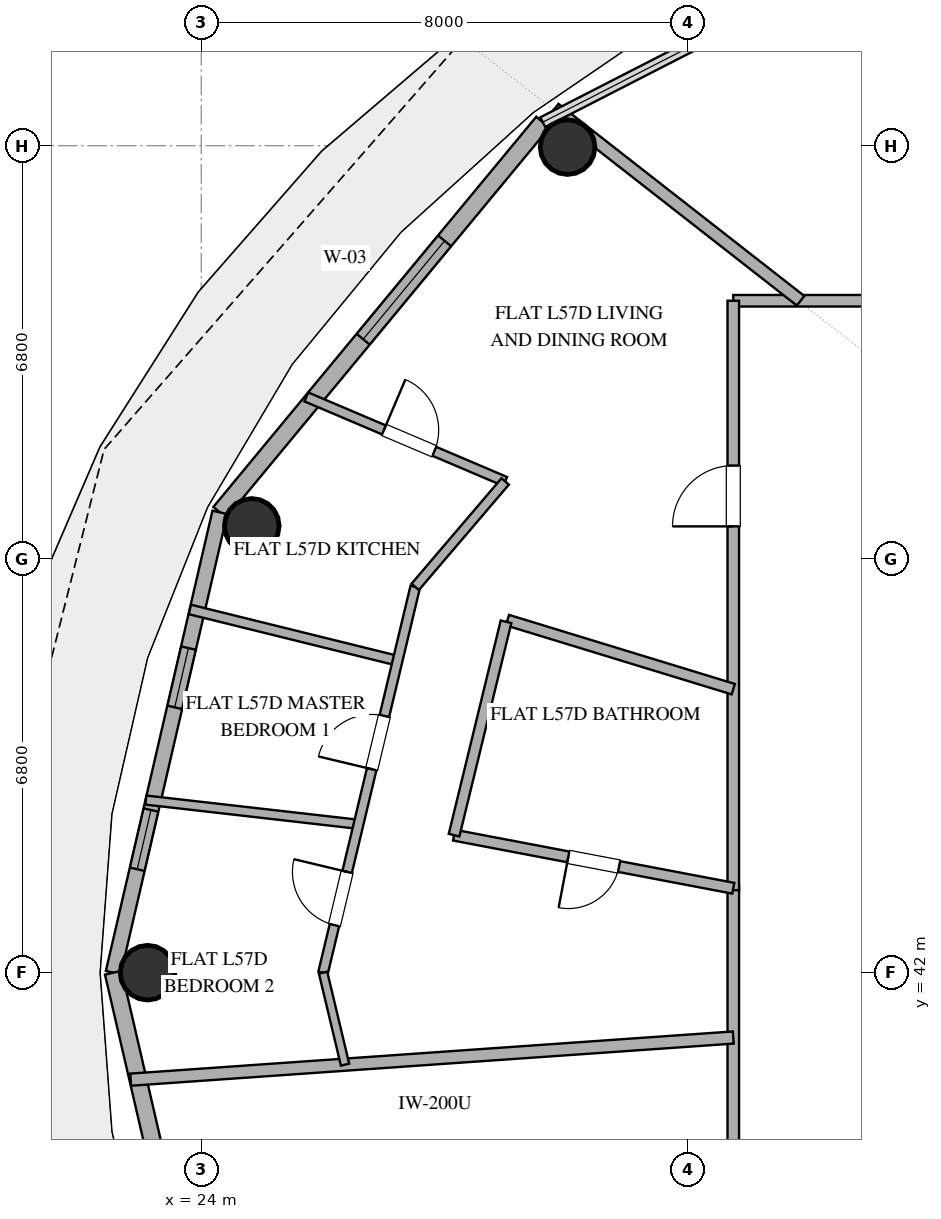
"""IFC4 building model, lengths in metres.
Left out: names, types, materials, properties, quantities, classifications, styles, units other than length and angle.
Written with IfcOpenShell. Run it as: python <this file> out.ifc"""

import sys

from ifc_helpers import new_model, si_unit, direction, frame, frame_2d, origin, origin_2d, place, context, subcontext, project, spatial, rectangle, hollow_circle, extrude, element, fill, save


model = new_model("IFC4")
c1 = context("Model", 3, precision=1e-05, world=origin(), true_north=direction((0.0, 1.0)))
c2 = subcontext(c1, "Body", "Model", "MODEL_VIEW")
j1 = project(units=[si_unit("LENGTHUNIT", "METRE"), si_unit("PLANEANGLEUNIT", "RADIAN")], contexts=[c1])
p1 = place(None, origin())
s1 = spatial("IfcSite", under=j1, at=p1, CompositionType="ELEMENT")
p2 = place(p1, origin())
s2 = spatial("IfcBuilding", under=s1, at=p2, CompositionType="ELEMENT")
p3 = place(p2, frame((0.0, 0.0, 224.4)))
s3 = spatial("IfcBuildingStorey", under=s2, at=p3, CompositionType="ELEMENT", Elevation=224.4)
for number, where, z_axis, x_axis in (
    (1, (30.025, 55.576, 0.0), (0.0, 0.0, 1.0), (1.0, 0.0, 0.0)),
    (2, (24.831, 49.347, 0.0), (0.0, 0.0, 1.0), (1.0, 0.0, 0.0)),
    (3, (23.117, 42.0, 0.0), (0.0, 0.0, 1.0), (1.0, 0.0, 0.0)),
):
    element("IfcColumn", number, at=place(p3, frame(where, z_axis=z_axis, x_axis=x_axis)), inside=s3, PredefinedType="COLUMN", context=c2, shape_type="SweptSolid", body=[
        extrude(hollow_circle(Radius=0.45, WallThickness=0.025, at=origin_2d()), origin(), (0.0, 0.0, 1.0), 3.36),
    ])
p4 = place(p3, frame((29.617, 55.987, 0.0), z_axis=(0.0, 0.0, 1.0), x_axis=(-0.63761509934, -0.770355103243, 0.0)))
e4 = element("IfcWall", 4, at=p4, inside=s3, PredefinedType="SOLIDWALL", context=c2, shape_type="SweptSolid", body=[
    extrude(rectangle(XDim=8.33, YDim=0.28, at=frame_2d((4.165, 0.0))), origin(), (0.0, 0.0, 1.0), 3.36),
])
p5 = place(p4, frame((2.533, 0.0, 0.85)))
e5 = element("IfcOpeningElement", 5, at=p5, cuts=e4, PredefinedType="OPENING", context=c2, shape_type="SweptSolid", body=[
    extrude(rectangle(XDim=2.1, YDim=2.2, at=frame_2d((1.05, 1.1))), frame((0.0, 0.15, 0.0), z_axis=(0.0, -1.0, 0.0), x_axis=(1.0, 0.0, 0.0)), (0.0, 0.0, 1.0), 0.3),
])
p6 = place(p3, frame((24.306, 49.57, 0.0), z_axis=(0.0, 0.0, 1.0), x_axis=(-0.225635078214, -0.974211892495, 0.0)))
e6 = element("IfcWall", 6, at=p6, inside=s3, PredefinedType="SOLIDWALL", context=c2, shape_type="SweptSolid", body=[
    extrude(rectangle(XDim=7.77, YDim=0.25, at=frame_2d((3.885, 0.0))), origin(), (0.0, 0.0, 1.0), 3.36),
])
p7 = place(p6, frame((2.291, 0.0, 0.35)))
e7 = element("IfcOpeningElement", 7, at=p7, cuts=e6, PredefinedType="OPENING", context=c2, shape_type="SweptSolid", body=[
    extrude(rectangle(XDim=1.0, YDim=1.05, at=frame_2d((0.5, 0.525))), frame((0.0, 0.135, 0.0), z_axis=(0.0, -1.0, 0.0), x_axis=(1.0, 0.0, 0.0)), (0.0, 0.0, 1.0), 0.27),
])
p8 = place(p6, frame((5.024, 0.0, 1.42)))
e8 = element("IfcOpeningElement", 8, at=p8, cuts=e6, PredefinedType="OPENING", context=c2, shape_type="SweptSolid", body=[
    extrude(rectangle(XDim=1.0, YDim=1.05, at=frame_2d((0.5, 0.525))), frame((0.0, 0.135, 0.0), z_axis=(0.0, -1.0, 0.0), x_axis=(1.0, 0.0, 0.0)), (0.0, 0.0, 1.0), 0.27),
])
p9 = place(p3, frame((22.553, 42.0, 0.0), z_axis=(0.0, 0.0, 1.0), x_axis=(0.225635078214, -0.974211892495, 0.0)))
e9 = element("IfcWall", 9, at=p9, inside=s3, PredefinedType="SOLIDWALL", context=c2, shape_type="SweptSolid", body=[
    extrude(rectangle(XDim=7.77, YDim=0.28, at=frame_2d((3.885, 0.0))), origin(), (0.0, 0.0, 1.0), 3.36),
])
p10 = place(p9, frame((5.192, 0.0, 0.0)))
e10 = element("IfcOpeningElement", 10, at=p10, cuts=e9, PredefinedType="OPENING", context=c2, shape_type="SweptSolid", body=[
    extrude(rectangle(XDim=1.05, YDim=2.2, at=frame_2d((0.525, 1.1))), frame((0.0, 0.15, 0.0), z_axis=(0.0, -1.0, 0.0), x_axis=(1.0, 0.0, 0.0)), (0.0, 0.0, 1.0), 0.3),
])
p11 = place(p3, frame((32.75, 53.05, 0.0), z_axis=(0.0, 0.0, 1.0), x_axis=(1.0, 0.0, 0.0)))
e11 = element("IfcWall", 11, at=p11, inside=s3, PredefinedType="PARTITIONING", context=c2, shape_type="SweptSolid", body=[
    extrude(rectangle(XDim=16.055, YDim=0.19, at=frame_2d((8.027, 0.0))), origin(), (0.0, 0.0, 1.0), 2.72),
])
p12 = place(p11, frame((5.874, 0.0, 0.0)))
e12 = element("IfcOpeningElement", 12, at=p12, cuts=e11, PredefinedType="OPENING", context=c2, shape_type="SweptSolid", body=[
    extrude(rectangle(XDim=1.0, YDim=2.2, at=frame_2d((0.5, 1.1))), frame((0.0, 0.105, 0.0), z_axis=(0.0, -1.0, 0.0), x_axis=(1.0, 0.0, 0.0)), (0.0, 0.0, 1.0), 0.21),
])
p13 = place(p3, frame((32.75, 30.95, 0.0), z_axis=(0.0, 0.0, 1.0), x_axis=(0.0, 1.0, 0.0)))
e13 = element("IfcWall", 13, at=p13, inside=s3, PredefinedType="PARTITIONING", context=c2, shape_type="SweptSolid", body=[
    extrude(rectangle(XDim=12.471, YDim=0.19, at=frame_2d((6.236, 0.0))), origin(), (0.0, 0.0, 1.0), 2.72),
])
p14 = place(p13, frame((4.508, 0.0, 0.0)))
e14 = element("IfcOpeningElement", 14, at=p14, cuts=e13, PredefinedType="OPENING", context=c2, shape_type="SweptSolid", body=[
    extrude(rectangle(XDim=1.0, YDim=2.2, at=frame_2d((0.5, 1.1))), frame((0.0, 0.105, 0.0), z_axis=(0.0, -1.0, 0.0), x_axis=(1.0, 0.0, 0.0)), (0.0, 0.0, 1.0), 0.21),
])
p15 = place(p3, frame((32.75, 43.356, 0.0), z_axis=(0.0, 0.0, 1.0), x_axis=(0.0, 1.0, 0.0)))
e15 = element("IfcWall", 15, at=p15, inside=s3, PredefinedType="PARTITIONING", context=c2, shape_type="SweptSolid", body=[
    extrude(rectangle(XDim=9.694, YDim=0.19, at=frame_2d((4.847, 0.0))), origin(), (0.0, 0.0, 1.0), 2.72),
])
p16 = place(p15, frame((5.983, 0.0, 0.0)))
e16 = element("IfcOpeningElement", 16, at=p16, cuts=e15, PredefinedType="OPENING", context=c2, shape_type="SweptSolid", body=[
    extrude(rectangle(XDim=1.0, YDim=2.2, at=frame_2d((0.5, 1.1))), frame((0.0, 0.105, 0.0), z_axis=(0.0, -1.0, 0.0), x_axis=(1.0, 0.0, 0.0)), (0.0, 0.0, 1.0), 0.21),
])
p17 = place(p3, frame((32.75, 40.934, 0.0), z_axis=(0.0, 0.0, 1.0), x_axis=(-0.997563620801, -0.069762615023, 0.0)))
e17 = element("IfcWall", 17, at=p17, inside=s3, PredefinedType="PARTITIONING", context=c2, shape_type="SweptSolid", body=[
    extrude(rectangle(XDim=9.935, YDim=0.2, at=frame_2d((4.968, 0.0))), origin(), (0.0, 0.0, 1.0), 2.72),
])
p18 = place(p3, frame((29.813, 56.209, 0.0), z_axis=(0.0, 0.0, 1.0), x_axis=(0.788043849094, -0.615619112687, 0.0)))
e18 = element("IfcWall", 18, at=p18, inside=s3, PredefinedType="PARTITIONING", context=c2, shape_type="SweptSolid", body=[
    extrude(rectangle(XDim=5.131, YDim=0.2, at=frame_2d((2.566, 0.0))), origin(), (0.0, 0.0, 1.0), 2.72),
])
p19 = place(p3, frame((32.75, 43.389, 0.0), z_axis=(0.0, 0.0, 1.0), x_axis=(-0.982412093784, 0.186725675755, 0.0)))
e19 = element("IfcWall", 19, at=p19, inside=s3, PredefinedType="PLUMBINGWALL", context=c2, shape_type="SweptSolid", body=[
    extrude(rectangle(XDim=4.674, YDim=0.18, at=frame_2d((2.337, 0.0))), origin(), (0.0, 0.0, 1.0), 2.72),
])
p20 = place(p19, frame((1.912, 0.0, 0.0)))
e20 = element("IfcOpeningElement", 20, at=p20, cuts=e19, PredefinedType="OPENING", context=c2, shape_type="SweptSolid", body=[
    extrude(rectangle(XDim=0.85, YDim=2.1, at=frame_2d((0.425, 1.05))), frame((0.0, 0.1, 0.0), z_axis=(0.0, -1.0, 0.0), x_axis=(1.0, 0.0, 0.0)), (0.0, 0.0, 1.0), 0.2),
])
p21 = place(p3, frame((29.036, 47.798, 0.0), z_axis=(0.0, 0.0, 1.0), x_axis=(0.956306177074, -0.292367056437, 0.0)))
e21 = element("IfcWall", 21, at=p21, inside=s3, PredefinedType="PLUMBINGWALL", context=c2, shape_type="SweptSolid", body=[
    extrude(rectangle(XDim=3.884, YDim=0.18, at=frame_2d((1.942, 0.0))), origin(), (0.0, 0.0, 1.0), 2.72),
])
p22 = place(p3, frame((28.158, 44.261, 0.0), z_axis=(0.0, 0.0, 1.0), x_axis=(0.236567164095, 0.971615138248, 0.0)))
e22 = element("IfcWall", 22, at=p22, inside=s3, PredefinedType="PLUMBINGWALL", context=c2, shape_type="SweptSolid", body=[
    extrude(rectangle(XDim=3.612, YDim=0.18, at=frame_2d((1.806, 0.0))), origin(), (0.0, 0.0, 1.0), 2.72),
])
p23 = place(p3, frame((25.729, 51.468, 0.0), z_axis=(0.0, 0.0, 1.0), x_axis=(0.920292576495, -0.39123084445, 0.0)))
e23 = element("IfcWall", 23, at=p23, inside=s3, PredefinedType="PLUMBINGWALL", context=c2, shape_type="SweptSolid", body=[
    extrude(rectangle(XDim=3.553, YDim=0.16, at=frame_2d((1.777, 0.0))), origin(), (0.0, 0.0, 1.0), 2.72),
])
p24 = place(p23, frame((1.387, 0.0, 0.0)))
e24 = element("IfcOpeningElement", 24, at=p24, cuts=e23, PredefinedType="OPENING", context=c2, shape_type="SweptSolid", body=[
    extrude(rectangle(XDim=0.9, YDim=2.1, at=frame_2d((0.45, 1.05))), frame((0.0, 0.09, 0.0), z_axis=(0.0, -1.0, 0.0), x_axis=(1.0, 0.0, 0.0)), (0.0, 0.0, 1.0), 0.18),
])
p25 = place(p3, frame((23.088, 44.838, 0.0), z_axis=(0.0, 0.0, 1.0), x_axis=(0.99356860566, -0.113231735156, 0.0)))
e25 = element("IfcWall", 25, at=p25, inside=s3, PredefinedType="PARTITIONING", context=c2, shape_type="SweptSolid", body=[
    extrude(rectangle(XDim=3.521, YDim=0.15, at=frame_2d((1.76, 0.0))), origin(), (0.0, 0.0, 1.0), 2.72),
])
p26 = place(p3, frame((27.229, 47.13, 0.0), z_axis=(0.0, 0.0, 1.0), x_axis=(-0.970832476512, 0.239758842484, 0.0)))
e26 = element("IfcWall", 26, at=p26, inside=s3, PredefinedType="PLUMBINGWALL", context=c2, shape_type="SweptSolid", body=[
    extrude(rectangle(XDim=3.518, YDim=0.16, at=frame_2d((1.759, 0.0))), origin(), (0.0, 0.0, 1.0), 2.72),
])
p27 = place(p3, frame((26.004, 42.0, 0.0), z_axis=(0.0, 0.0, 1.0), x_axis=(0.232298462197, 0.972644551962, 0.0)))
e27 = element("IfcWall", 27, at=p27, inside=s3, PredefinedType="PLUMBINGWALL", context=c2, shape_type="SweptSolid", body=[
    extrude(rectangle(XDim=6.523, YDim=0.16, at=frame_2d((3.262, 0.0))), origin(), (0.0, 0.0, 1.0), 2.72),
])
p28 = place(p27, frame((3.441, 0.0, 0.0)))
e28 = element("IfcOpeningElement", 28, at=p28, cuts=e27, PredefinedType="OPENING", context=c2, shape_type="SweptSolid", body=[
    extrude(rectangle(XDim=0.9, YDim=2.1, at=frame_2d((0.45, 1.05))), frame((0.0, 0.09, 0.0), z_axis=(0.0, -1.0, 0.0), x_axis=(1.0, 0.0, 0.0)), (0.0, 0.0, 1.0), 0.18),
])
p29 = place(p27, frame((0.804, 0.0, 0.0)))
e29 = element("IfcOpeningElement", 29, at=p29, cuts=e27, PredefinedType="OPENING", context=c2, shape_type="SweptSolid", body=[
    extrude(rectangle(XDim=0.9, YDim=2.1, at=frame_2d((0.45, 1.05))), frame((0.0, 0.09, 0.0), z_axis=(0.0, -1.0, 0.0), x_axis=(1.0, 0.0, 0.0)), (0.0, 0.0, 1.0), 0.18),
])
p30 = place(p3, frame((28.999, 50.078, 0.0), z_axis=(0.0, 0.0, 1.0), x_axis=(-0.649254822002, -0.760570954025, 0.0)))
e30 = element("IfcWall", 30, at=p30, inside=s3, PredefinedType="PLUMBINGWALL", context=c2, shape_type="SweptSolid", body=[
    extrude(rectangle(XDim=2.279, YDim=0.16, at=frame_2d((1.139, 0.0))), origin(), (0.0, 0.0, 1.0), 2.72),
])
p31 = place(p3, frame((26.004, 42.0, 0.0), z_axis=(0.0, 0.0, 1.0), x_axis=(0.232292411737, -0.972645996984, 0.0)))
e31 = element("IfcWall", 31, at=p31, inside=s3, PredefinedType="PARTITIONING", context=c2, shape_type="SweptSolid", body=[
    extrude(rectangle(XDim=1.555, YDim=0.14, at=frame_2d((0.778, 0.0))), origin(), (0.0, 0.0, 1.0), 2.72),
])
p32 = place(p5, origin())
e32 = element("IfcWindow", 32, at=p32, inside=s3, PartitioningType="SINGLE_PANEL", PredefinedType="WINDOW", context=c2, shape_type="SweptSolid", body=[
    extrude(rectangle(XDim=2.1, YDim=2.2, at=frame_2d((1.05, 1.1))), frame((0.0, 0.03, 0.0), z_axis=(0.0, -1.0, 0.0), x_axis=(1.0, 0.0, 0.0)), (0.0, 0.0, 1.0), 0.06),
])
fill(e5, e32)
p33 = place(p7, origin())
e33 = element("IfcWindow", 33, at=p33, inside=s3, PartitioningType="SINGLE_PANEL", PredefinedType="WINDOW", context=c2, shape_type="SweptSolid", body=[
    extrude(rectangle(XDim=1.0, YDim=1.05, at=frame_2d((0.5, 0.525))), frame((0.0, 0.03, 0.0), z_axis=(0.0, -1.0, 0.0), x_axis=(1.0, 0.0, 0.0)), (0.0, 0.0, 1.0), 0.06),
])
fill(e7, e33)
p34 = place(p8, origin())
e34 = element("IfcWindow", 34, at=p34, inside=s3, PartitioningType="SINGLE_PANEL", PredefinedType="WINDOW", context=c2, shape_type="SweptSolid", body=[
    extrude(rectangle(XDim=1.0, YDim=1.05, at=frame_2d((0.5, 0.525))), frame((0.0, 0.03, 0.0), z_axis=(0.0, -1.0, 0.0), x_axis=(1.0, 0.0, 0.0)), (0.0, 0.0, 1.0), 0.06),
])
fill(e8, e34)
p35 = place(p16, origin())
e35 = element("IfcDoor", 35, at=p35, inside=s3, OperationType="SINGLE_SWING_LEFT", PredefinedType="DOOR", context=c2, shape_type="SweptSolid", body=[
    extrude(rectangle(XDim=1.0, YDim=2.2, at=frame_2d((0.5, 1.1))), frame((0.0, 0.025, 0.0), z_axis=(0.0, -1.0, 0.0), x_axis=(1.0, 0.0, 0.0)), (0.0, 0.0, 1.0), 0.05),
])
fill(e16, e35)
p36 = place(p20, origin())
e36 = element("IfcDoor", 36, at=p36, inside=s3, OperationType="SINGLE_SWING_RIGHT", PredefinedType="DOOR", context=c2, shape_type="SweptSolid", body=[
    extrude(rectangle(XDim=0.85, YDim=2.1, at=frame_2d((0.425, 1.05))), frame((0.0, 0.025, 0.0), z_axis=(0.0, -1.0, 0.0), x_axis=(1.0, 0.0, 0.0)), (0.0, 0.0, 1.0), 0.05),
])
fill(e20, e36)
p37 = place(p24, origin())
e37 = element("IfcDoor", 37, at=p37, inside=s3, OperationType="SINGLE_SWING_LEFT", PredefinedType="DOOR", context=c2, shape_type="SweptSolid", body=[
    extrude(rectangle(XDim=0.9, YDim=2.1, at=frame_2d((0.45, 1.05))), frame((0.0, 0.025, 0.0), z_axis=(0.0, -1.0, 0.0), x_axis=(1.0, 0.0, 0.0)), (0.0, 0.0, 1.0), 0.05),
])
fill(e24, e37)
p38 = place(p28, origin())
e38 = element("IfcDoor", 38, at=p38, inside=s3, OperationType="SINGLE_SWING_LEFT", PredefinedType="DOOR", context=c2, shape_type="SweptSolid", body=[
    extrude(rectangle(XDim=0.9, YDim=2.1, at=frame_2d((0.45, 1.05))), frame((0.0, 0.025, 0.0), z_axis=(0.0, -1.0, 0.0), x_axis=(1.0, 0.0, 0.0)), (0.0, 0.0, 1.0), 0.05),
])
fill(e28, e38)
p39 = place(p29, origin())
e39 = element("IfcDoor", 39, at=p39, inside=s3, OperationType="SINGLE_SWING_RIGHT", PredefinedType="DOOR", context=c2, shape_type="SweptSolid", body=[
    extrude(rectangle(XDim=0.9, YDim=2.1, at=frame_2d((0.45, 1.05))), frame((0.0, 0.025, 0.0), z_axis=(0.0, -1.0, 0.0), x_axis=(1.0, 0.0, 0.0)), (0.0, 0.0, 1.0), 0.05),
])
fill(e29, e39)
save(model, sys.argv[1])
